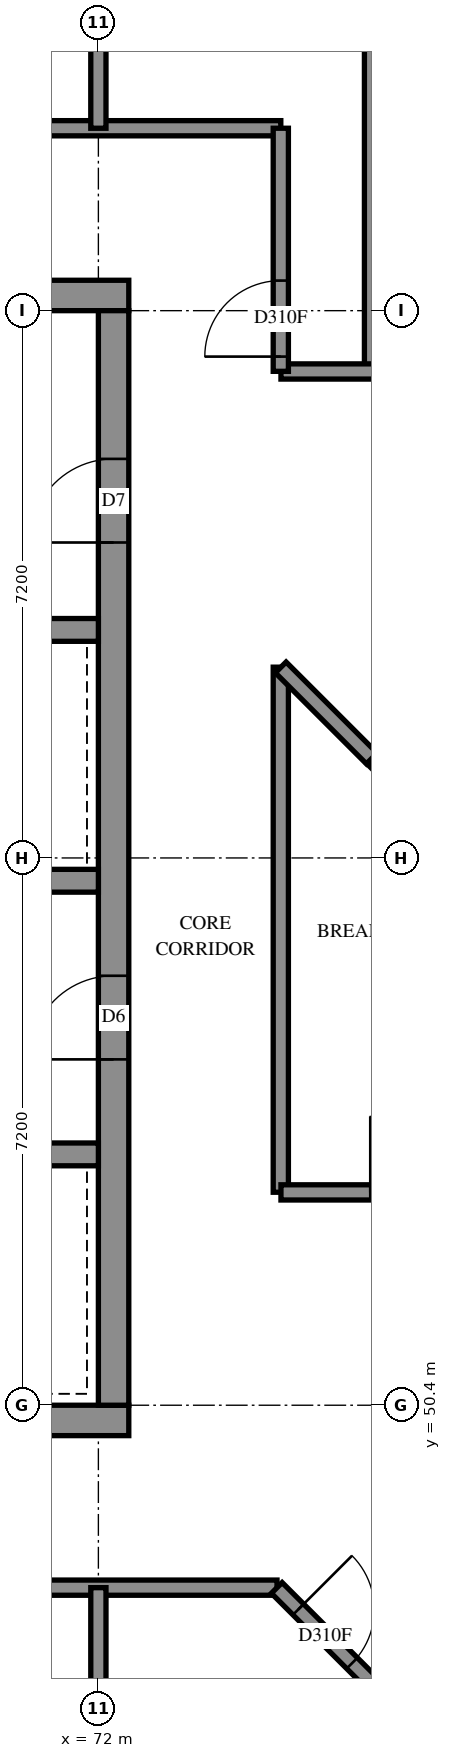
"""IFC4 building model, lengths in metres.
Left out: names, types, materials, properties, quantities, classifications, styles, units other than length and angle.
Written with IfcOpenShell. Run it as: python <this file> out.ifc"""

import sys

from ifc_helpers import new_model, si_unit, direction, frame, frame_2d, origin, place, context, subcontext, project, spatial, rectangle, extrude, element, fill, save


model = new_model("IFC4")
c1 = context("Model", 3, precision=1e-05, world=origin(), true_north=direction((0.0, 1.0)))
c2 = subcontext(c1, "Body", "Model", "MODEL_VIEW")
j1 = project(units=[si_unit("LENGTHUNIT", "METRE"), si_unit("PLANEANGLEUNIT", "RADIAN")], contexts=[c1])
p1 = place(None, origin())
s1 = spatial("IfcSite", under=j1, at=p1, CompositionType="ELEMENT")
p2 = place(p1, origin())
s2 = spatial("IfcBuilding", under=s1, at=p2, CompositionType="ELEMENT")
p3 = place(p2, frame((0.0, 0.0, 274.4)))
s3 = spatial("IfcBuildingStorey", under=s2, at=p3, CompositionType="ELEMENT", Elevation=274.4)
p4 = place(p3, frame((57.2, 50.2, -0.3), z_axis=(0.0, 0.0, 1.0), x_axis=(1.0, 0.0, 0.0)))
e1 = element("IfcWall", 1, at=p4, inside=s3, PredefinedType="SHEAR", context=c2, shape_type="SweptSolid", body=[
    extrude(rectangle(XDim=15.2, YDim=0.4, at=frame_2d((7.6, 0.0))), origin(), (0.0, 0.0, 1.0), 2.7),
])
p5 = place(p3, frame((57.2, 65.0, -0.3), z_axis=(0.0, 0.0, 1.0), x_axis=(1.0, 0.0, 0.0)))
e2 = element("IfcWall", 2, at=p5, inside=s3, PredefinedType="SHEAR", context=c2, shape_type="SweptSolid", body=[
    extrude(rectangle(XDim=15.2, YDim=0.4, at=frame_2d((7.6, 0.0))), origin(), (0.0, 0.0, 1.0), 2.7),
])
p6 = place(p5, frame((10.4, 0.0, 0.3)))
e3 = element("IfcOpeningElement", 3, at=p6, cuts=e2, PredefinedType="OPENING", context=c2, shape_type="SweptSolid", body=[
    extrude(rectangle(XDim=0.8, YDim=2.1, at=frame_2d((0.4, 1.05))), frame((0.0, 0.21, 0.0), z_axis=(0.0, -1.0, 0.0), x_axis=(1.0, 0.0, 0.0)), (0.0, 0.0, 1.0), 0.42),
])
p7 = place(p3, frame((72.2, 50.4, -0.3), z_axis=(0.0, 0.0, 1.0), x_axis=(0.0, 1.0, 0.0)))
e4 = element("IfcWall", 4, at=p7, inside=s3, PredefinedType="SHEAR", context=c2, shape_type="SweptSolid", body=[
    extrude(rectangle(XDim=14.4, YDim=0.4, at=frame_2d((7.2, 0.0))), origin(), (0.0, 0.0, 1.0), 2.7),
])
p8 = place(p7, frame((4.55, 0.0, 0.3)))
e5 = element("IfcOpeningElement", 5, at=p8, cuts=e4, PredefinedType="OPENING", context=c2, shape_type="SweptSolid", body=[
    extrude(rectangle(XDim=1.1, YDim=2.1, at=frame_2d((0.55, 1.05))), frame((0.0, 0.21, 0.0), z_axis=(0.0, -1.0, 0.0), x_axis=(1.0, 0.0, 0.0)), (0.0, 0.0, 1.0), 0.42),
])
p9 = place(p7, frame((11.35, 0.0, 0.3)))
e6 = element("IfcOpeningElement", 6, at=p9, cuts=e4, PredefinedType="OPENING", context=c2, shape_type="SweptSolid", body=[
    extrude(rectangle(XDim=1.1, YDim=2.1, at=frame_2d((0.55, 1.05))), frame((0.0, 0.21, 0.0), z_axis=(0.0, -1.0, 0.0), x_axis=(1.0, 0.0, 0.0)), (0.0, 0.0, 1.0), 0.42),
])
p10 = place(p3, frame((57.6, 53.7, 0.0), z_axis=(0.0, 0.0, 1.0), x_axis=(1.0, 0.0, 0.0)))
e7 = element("IfcWall", 7, at=p10, inside=s3, PredefinedType="SOLIDWALL", context=c2, shape_type="SweptSolid", body=[
    extrude(rectangle(XDim=14.4, YDim=0.3, at=frame_2d((7.2, 0.0))), origin(), (0.0, 0.0, 1.0), 3.1),
])
p11 = place(p10, frame((1.35, 0.0, 0.0)))
e8 = element("IfcOpeningElement", 8, at=p11, cuts=e7, PredefinedType="OPENING", context=c2, shape_type="SweptSolid", body=[
    extrude(rectangle(XDim=0.9, YDim=2.1, at=frame_2d((0.45, 1.05))), frame((0.0, 0.16, 0.0), z_axis=(0.0, -1.0, 0.0), x_axis=(1.0, 0.0, 0.0)), (0.0, 0.0, 1.0), 0.32),
])
p12 = place(p10, frame((4.95, 0.0, 0.0)))
e9 = element("IfcOpeningElement", 9, at=p12, cuts=e7, PredefinedType="OPENING", context=c2, shape_type="SweptSolid", body=[
    extrude(rectangle(XDim=0.9, YDim=2.1, at=frame_2d((0.45, 1.05))), frame((0.0, 0.16, 0.0), z_axis=(0.0, -1.0, 0.0), x_axis=(1.0, 0.0, 0.0)), (0.0, 0.0, 1.0), 0.32),
])
p13 = place(p10, frame((8.55, 0.0, 0.0)))
e10 = element("IfcOpeningElement", 10, at=p13, cuts=e7, PredefinedType="OPENING", context=c2, shape_type="SweptSolid", body=[
    extrude(rectangle(XDim=0.9, YDim=2.1, at=frame_2d((0.45, 1.05))), frame((0.0, 0.16, 0.0), z_axis=(0.0, -1.0, 0.0), x_axis=(1.0, 0.0, 0.0)), (0.0, 0.0, 1.0), 0.32),
])
p14 = place(p10, frame((12.05, 0.0, 0.0)))
e11 = element("IfcOpeningElement", 11, at=p14, cuts=e7, PredefinedType="OPENING", context=c2, shape_type="SweptSolid", body=[
    extrude(rectangle(XDim=1.1, YDim=2.1, at=frame_2d((0.55, 1.05))), frame((0.0, 0.16, 0.0), z_axis=(0.0, -1.0, 0.0), x_axis=(1.0, 0.0, 0.0)), (0.0, 0.0, 1.0), 0.32),
])
p15 = place(p3, frame((57.6, 57.3, 0.0), z_axis=(0.0, 0.0, 1.0), x_axis=(1.0, 0.0, 0.0)))
e12 = element("IfcWall", 12, at=p15, inside=s3, PredefinedType="SOLIDWALL", context=c2, shape_type="SweptSolid", body=[
    extrude(rectangle(XDim=14.4, YDim=0.3, at=frame_2d((7.2, 0.0))), origin(), (0.0, 0.0, 1.0), 3.1),
])
p16 = place(p15, frame((8.55, 0.0, 0.0)))
e13 = element("IfcOpeningElement", 13, at=p16, cuts=e12, PredefinedType="OPENING", context=c2, shape_type="SweptSolid", body=[
    extrude(rectangle(XDim=0.9, YDim=2.1, at=frame_2d((0.45, 1.05))), frame((0.0, 0.16, 0.0), z_axis=(0.0, -1.0, 0.0), x_axis=(1.0, 0.0, 0.0)), (0.0, 0.0, 1.0), 0.32),
])
p17 = place(p15, frame((1.25, 0.0, 0.0)))
e14 = element("IfcOpeningElement", 14, at=p17, cuts=e12, PredefinedType="OPENING", context=c2, shape_type="SweptSolid", body=[
    extrude(rectangle(XDim=1.1, YDim=2.1, at=frame_2d((0.55, 1.05))), frame((0.0, 0.16, 0.0), z_axis=(0.0, -1.0, 0.0), x_axis=(1.0, 0.0, 0.0)), (0.0, 0.0, 1.0), 0.32),
])
p18 = place(p15, frame((4.85, 0.0, 0.0)))
e15 = element("IfcOpeningElement", 15, at=p18, cuts=e12, PredefinedType="OPENING", context=c2, shape_type="SweptSolid", body=[
    extrude(rectangle(XDim=1.1, YDim=2.1, at=frame_2d((0.55, 1.05))), frame((0.0, 0.16, 0.0), z_axis=(0.0, -1.0, 0.0), x_axis=(1.0, 0.0, 0.0)), (0.0, 0.0, 1.0), 0.32),
])
p19 = place(p15, frame((12.05, 0.0, 0.0)))
e16 = element("IfcOpeningElement", 16, at=p19, cuts=e12, PredefinedType="OPENING", context=c2, shape_type="SweptSolid", body=[
    extrude(rectangle(XDim=1.1, YDim=2.1, at=frame_2d((0.55, 1.05))), frame((0.0, 0.16, 0.0), z_axis=(0.0, -1.0, 0.0), x_axis=(1.0, 0.0, 0.0)), (0.0, 0.0, 1.0), 0.32),
])
p20 = place(p3, frame((64.8, 60.6, 0.0), z_axis=(0.0, 0.0, 1.0), x_axis=(1.0, 0.0, 0.0)))
e17 = element("IfcWall", 17, at=p20, inside=s3, PredefinedType="SOLIDWALL", context=c2, shape_type="SweptSolid", body=[
    extrude(rectangle(XDim=7.2, YDim=0.3, at=frame_2d((3.6, 0.0))), origin(), (0.0, 0.0, 1.0), 3.1),
])
p21 = place(p3, frame((55.2, 67.2, 0.0), z_axis=(0.0, 0.0, 1.0), x_axis=(1.0, 0.0, 0.0)))
e18 = element("IfcWall", 18, at=p21, inside=s3, PredefinedType="PARTITIONING", context=c2, shape_type="SweptSolid", body=[
    extrude(rectangle(XDim=19.2, YDim=0.2, at=frame_2d((9.6, 0.0))), origin(), (0.0, 0.0, 1.0), 3.1),
])
p22 = place(p21, frame((6.108, 0.0, 0.0)))
e19 = element("IfcOpeningElement", 19, at=p22, cuts=e18, PredefinedType="OPENING", context=c2, shape_type="SweptSolid", body=[
    extrude(rectangle(XDim=0.9, YDim=2.1, at=frame_2d((0.45, 1.05))), frame((0.0, 0.11, 0.0), z_axis=(0.0, -1.0, 0.0), x_axis=(1.0, 0.0, 0.0)), (0.0, 0.0, 1.0), 0.22),
])
p23 = place(p21, frame((11.675, 0.0, 0.0)))
e20 = element("IfcOpeningElement", 20, at=p23, cuts=e18, PredefinedType="OPENING", context=c2, shape_type="SweptSolid", body=[
    extrude(rectangle(XDim=1.0, YDim=2.1, at=frame_2d((0.5, 1.05))), frame((0.0, 0.11, 0.0), z_axis=(0.0, -1.0, 0.0), x_axis=(1.0, 0.0, 0.0)), (0.0, 0.0, 1.0), 0.22),
])
p24 = place(p21, frame((13.725, 0.0, 0.0)))
e21 = element("IfcOpeningElement", 21, at=p24, cuts=e18, PredefinedType="OPENING", context=c2, shape_type="SweptSolid", body=[
    extrude(rectangle(XDim=1.0, YDim=2.1, at=frame_2d((0.5, 1.05))), frame((0.0, 0.11, 0.0), z_axis=(0.0, -1.0, 0.0), x_axis=(1.0, 0.0, 0.0)), (0.0, 0.0, 1.0), 0.22),
])
p25 = place(p3, frame((55.2, 48.0, 0.0), z_axis=(0.0, 0.0, 1.0), x_axis=(1.0, 0.0, 0.0)))
e22 = element("IfcWall", 22, at=p25, inside=s3, PredefinedType="PARTITIONING", context=c2, shape_type="SweptSolid", body=[
    extrude(rectangle(XDim=19.15, YDim=0.2, at=frame_2d((9.575, 0.0))), origin(), (0.0, 0.0, 1.0), 3.1),
])
p26 = place(p25, frame((6.261, 0.0, 0.0)))
e23 = element("IfcOpeningElement", 23, at=p26, cuts=e22, PredefinedType="OPENING", context=c2, shape_type="SweptSolid", body=[
    extrude(rectangle(XDim=0.9, YDim=2.1, at=frame_2d((0.45, 1.05))), frame((0.0, 0.11, 0.0), z_axis=(0.0, -1.0, 0.0), x_axis=(1.0, 0.0, 0.0)), (0.0, 0.0, 1.0), 0.22),
])
p27 = place(p25, frame((13.499, 0.0, 0.0)))
e24 = element("IfcOpeningElement", 24, at=p27, cuts=e22, PredefinedType="OPENING", context=c2, shape_type="SweptSolid", body=[
    extrude(rectangle(XDim=0.9, YDim=2.1, at=frame_2d((0.45, 1.05))), frame((0.0, 0.11, 0.0), z_axis=(0.0, -1.0, 0.0), x_axis=(1.0, 0.0, 0.0)), (0.0, 0.0, 1.0), 0.22),
])
p28 = place(p3, frame((75.6, 64.0, 0.0), z_axis=(0.0, 0.0, 1.0), x_axis=(0.0, 1.0, 0.0)))
e25 = element("IfcWall", 25, at=p28, inside=s3, PredefinedType="PARTITIONING", context=c2, shape_type="SweptSolid", body=[
    extrude(rectangle(XDim=8.856, YDim=0.2, at=frame_2d((4.428, 0.0))), origin(), (0.0, 0.0, 1.0), 3.1),
])
p29 = place(p3, frame((74.4, 53.202, 0.0), z_axis=(0.0, 0.0, 1.0), x_axis=(0.0, 1.0, 0.0)))
e26 = element("IfcWall", 26, at=p29, inside=s3, PredefinedType="PARTITIONING", context=c2, shape_type="SweptSolid", body=[
    extrude(rectangle(XDim=6.908, YDim=0.2, at=frame_2d((3.454, 0.0))), origin(), (0.0, 0.0, 1.0), 3.1),
])
p30 = place(p3, frame((74.402, 64.0, 0.0), z_axis=(0.0, 0.0, 1.0), x_axis=(1.0, 0.0, 0.0)))
e27 = element("IfcWall", 27, at=p30, inside=s3, PredefinedType="PARTITIONING", context=c2, shape_type="SweptSolid", body=[
    extrude(rectangle(XDim=4.798, YDim=0.2, at=frame_2d((2.399, 0.0))), origin(), (0.0, 0.0, 1.0), 3.1),
])
p31 = place(p30, frame((1.723, 0.0, 0.0)))
e28 = element("IfcOpeningElement", 28, at=p31, cuts=e27, PredefinedType="OPENING", context=c2, shape_type="SweptSolid", body=[
    extrude(rectangle(XDim=1.0, YDim=2.1, at=frame_2d((0.5, 1.05))), frame((0.0, 0.11, 0.0), z_axis=(0.0, -1.0, 0.0), x_axis=(1.0, 0.0, 0.0)), (0.0, 0.0, 1.0), 0.22),
])
p32 = place(p3, frame((74.347, 47.997, 0.0), z_axis=(0.0, 0.0, 1.0), x_axis=(0.7071067812, -0.7071067812, 0.0)))
e29 = element("IfcWall", 29, at=p32, inside=s3, PredefinedType="PARTITIONING", context=c2, shape_type="SweptSolid", body=[
    extrude(rectangle(XDim=4.596, YDim=0.2, at=frame_2d((2.298, 0.0))), origin(), (0.0, 0.0, 1.0), 3.1),
])
p33 = place(p32, frame((0.401, 0.0, 0.0)))
e30 = element("IfcOpeningElement", 30, at=p33, cuts=e29, PredefinedType="OPENING", context=c2, shape_type="SweptSolid", body=[
    extrude(rectangle(XDim=1.0, YDim=2.1, at=frame_2d((0.5, 1.05))), frame((0.0, 0.11, 0.0), z_axis=(0.0, -1.0, 0.0), x_axis=(1.0, 0.0, 0.0)), (0.0, 0.0, 1.0), 0.22),
])
for number, where, z_axis, x_axis in (
    (31, (72.0, 43.55, 0.0), (0.0, 0.0, 1.0), (0.0, 1.0, 0.0)),
    (32, (72.0, 67.2, 0.0), (0.0, 0.0, 1.0), (0.0, 1.0, 0.0)),
):
    element("IfcWall", number, at=place(p3, frame(where, z_axis=z_axis, x_axis=x_axis)), inside=s3, PredefinedType="PARTITIONING", context=c2, shape_type="SweptSolid", body=[
        extrude(rectangle(XDim=4.45, YDim=0.2, at=frame_2d((2.225, 0.0))), origin(), (0.0, 0.0, 1.0), 3.1),
    ])
p34 = place(p3, frame((74.4, 64.002, 0.0), z_axis=(0.0, 0.0, 1.0), x_axis=(0.0, 1.0, 0.0)))
e33 = element("IfcWall", 33, at=p34, inside=s3, PredefinedType="PARTITIONING", context=c2, shape_type="SweptSolid", body=[
    extrude(rectangle(XDim=3.198, YDim=0.2, at=frame_2d((1.599, 0.0))), origin(), (0.0, 0.0, 1.0), 3.1),
])
p35 = place(p34, frame((0.194, 0.0, 0.0)))
e34 = element("IfcOpeningElement", 34, at=p35, cuts=e33, PredefinedType="OPENING", context=c2, shape_type="SweptSolid", body=[
    extrude(rectangle(XDim=1.0, YDim=2.1, at=frame_2d((0.5, 1.05))), frame((0.0, 0.11, 0.0), z_axis=(0.0, -1.0, 0.0), x_axis=(1.0, 0.0, 0.0)), (0.0, 0.0, 1.0), 0.22),
])
p36 = place(p3, frame((74.402, 53.2, 0.0), z_axis=(0.0, 0.0, 1.0), x_axis=(1.0, 0.0, 0.0)))
e35 = element("IfcWall", 35, at=p36, inside=s3, PredefinedType="PARTITIONING", context=c2, shape_type="SweptSolid", body=[
    extrude(rectangle(XDim=2.968, YDim=0.2, at=frame_2d((1.484, 0.0))), origin(), (0.0, 0.0, 1.0), 3.1),
])
p37 = place(p36, frame((1.175, 0.0, 0.0)))
e36 = element("IfcOpeningElement", 36, at=p37, cuts=e35, PredefinedType="OPENING", context=c2, shape_type="SweptSolid", body=[
    extrude(rectangle(XDim=1.0, YDim=2.1, at=frame_2d((0.5, 1.05))), frame((0.0, 0.11, 0.0), z_axis=(0.0, -1.0, 0.0), x_axis=(1.0, 0.0, 0.0)), (0.0, 0.0, 1.0), 0.22),
])
p38 = place(p3, frame((75.601, 58.913, 0.0), z_axis=(0.0, 0.0, 1.0), x_axis=(0.707460777, -0.7067526081, 0.0)))
e37 = element("IfcWall", 37, at=p38, inside=s3, PredefinedType="PARTITIONING", context=c2, shape_type="SweptSolid", body=[
    extrude(rectangle(XDim=2.824, YDim=0.2, at=frame_2d((1.412, 0.0))), origin(), (0.0, 0.0, 1.0), 3.1),
])
p39 = place(p3, frame((74.399, 60.107, 0.0), z_axis=(0.0, 0.0, 1.0), x_axis=(0.7071067812, -0.7071067812, 0.0)))
e38 = element("IfcWall", 38, at=p39, inside=s3, PredefinedType="PARTITIONING", context=c2, shape_type="SweptSolid", body=[
    extrude(rectangle(XDim=1.694, YDim=0.2, at=frame_2d((0.847, 0.0))), origin(), (0.0, 0.0, 1.0), 3.1),
])
p40 = place(p8, origin())
e39 = element("IfcDoor", 39, at=p40, inside=s3, OperationType="DOUBLE_DOOR_SINGLE_SWING", PredefinedType="DOOR", context=c2, shape_type="SweptSolid", body=[
    extrude(rectangle(XDim=1.1, YDim=2.1, at=frame_2d((0.55, 1.05))), frame((0.0, 0.025, 0.0), z_axis=(0.0, -1.0, 0.0), x_axis=(1.0, 0.0, 0.0)), (0.0, 0.0, 1.0), 0.05),
])
fill(e5, e39)
p41 = place(p9, origin())
e40 = element("IfcDoor", 40, at=p41, inside=s3, OperationType="SINGLE_SWING_RIGHT", PredefinedType="DOOR", context=c2, shape_type="SweptSolid", body=[
    extrude(rectangle(XDim=1.1, YDim=2.1, at=frame_2d((0.55, 1.05))), frame((0.0, 0.025, 0.0), z_axis=(0.0, -1.0, 0.0), x_axis=(1.0, 0.0, 0.0)), (0.0, 0.0, 1.0), 0.05),
])
fill(e6, e40)
p42 = place(p37, origin())
e41 = element("IfcDoor", 41, at=p42, inside=s3, OperationType="SINGLE_SWING_LEFT", PredefinedType="DOOR", context=c2, shape_type="SweptSolid", body=[
    extrude(rectangle(XDim=1.0, YDim=2.1, at=frame_2d((0.5, 1.05))), frame((0.0, 0.025, 0.0), z_axis=(0.0, -1.0, 0.0), x_axis=(1.0, 0.0, 0.0)), (0.0, 0.0, 1.0), 0.05),
])
fill(e36, e41)
p43 = place(p35, origin())
e42 = element("IfcDoor", 42, at=p43, inside=s3, OperationType="SINGLE_SWING_RIGHT", PredefinedType="DOOR", context=c2, shape_type="SweptSolid", body=[
    extrude(rectangle(XDim=1.0, YDim=2.1, at=frame_2d((0.5, 1.05))), frame((0.0, 0.025, 0.0), z_axis=(0.0, -1.0, 0.0), x_axis=(1.0, 0.0, 0.0)), (0.0, 0.0, 1.0), 0.05),
])
fill(e34, e42)
p44 = place(p33, origin())
e43 = element("IfcDoor", 43, at=p44, inside=s3, OperationType="SINGLE_SWING_LEFT", PredefinedType="DOOR", context=c2, shape_type="SweptSolid", body=[
    extrude(rectangle(XDim=1.0, YDim=2.1, at=frame_2d((0.5, 1.05))), frame((0.0, 0.025, 0.0), z_axis=(0.0, -1.0, 0.0), x_axis=(1.0, 0.0, 0.0)), (0.0, 0.0, 1.0), 0.05),
])
fill(e30, e43)
save(model, sys.argv[1])
